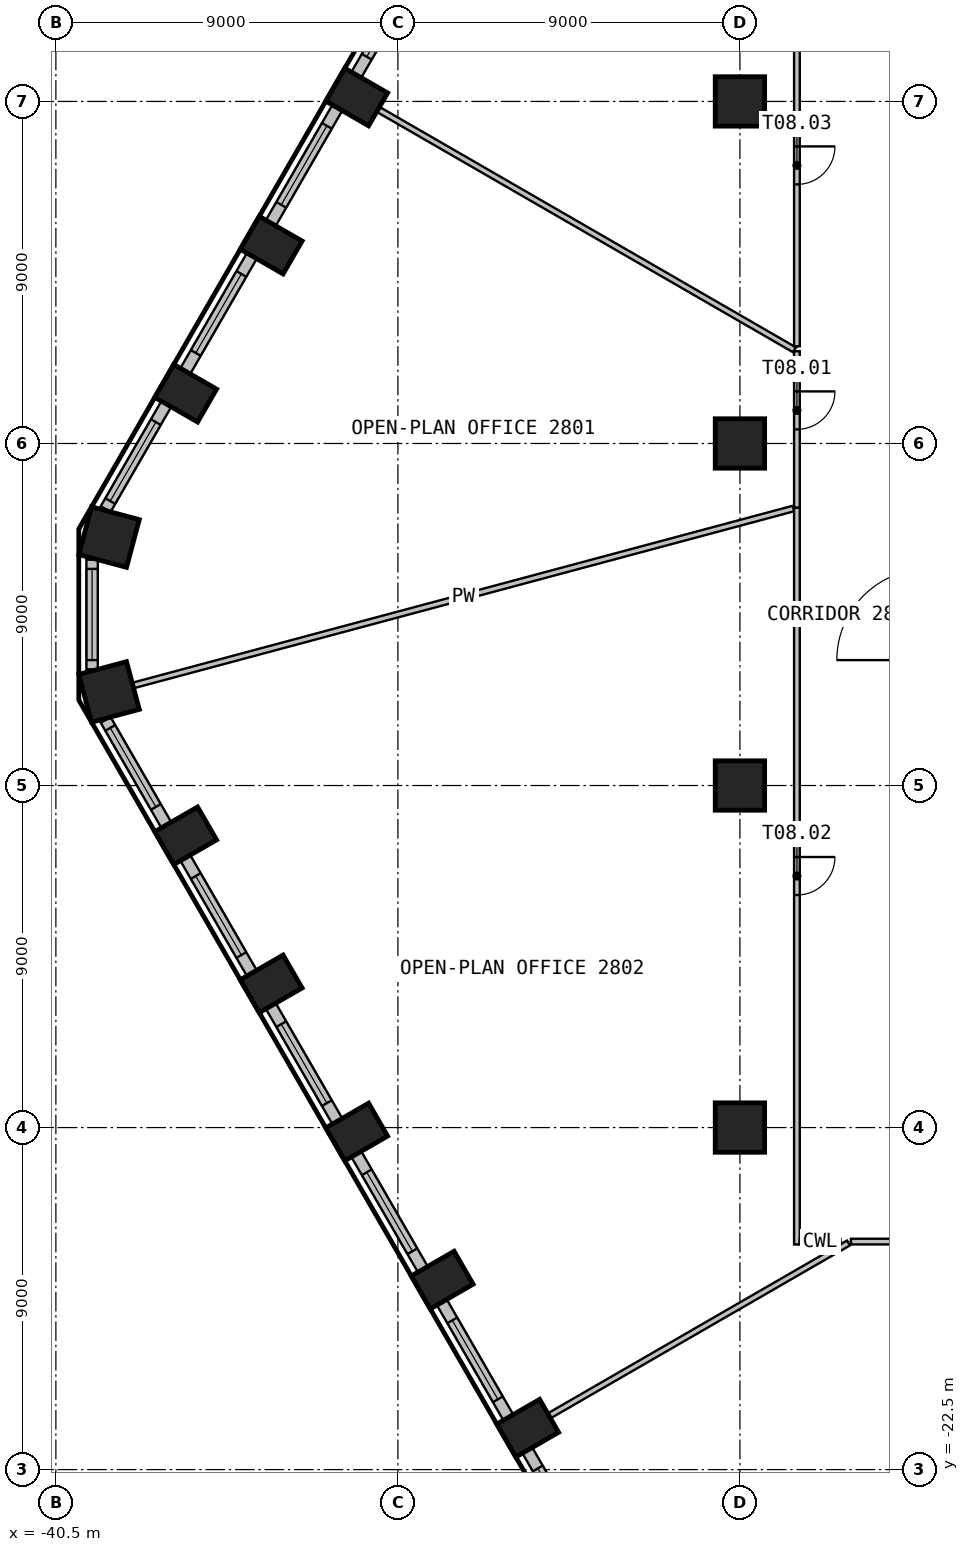
"""IFC4 building model, lengths in metres.
Left out: names, types, materials, properties, quantities, classifications, styles, units other than length and angle.
Written with IfcOpenShell. Run it as: python <this file> out.ifc"""

import sys

from ifc_helpers import new_model, si_unit, direction, frame, frame_2d, origin, origin_2d, place, context, subcontext, project, spatial, rectangle, circle, extrude, element, fill, save


model = new_model("IFC4")
c1 = context("Model", 3, precision=1e-05, world=origin(), true_north=direction((0.0, 1.0)))
c2 = subcontext(c1, "Body", "Model", "MODEL_VIEW")
j1 = project(units=[si_unit("LENGTHUNIT", "METRE"), si_unit("PLANEANGLEUNIT", "RADIAN")], contexts=[c1])
p1 = place(None, origin())
s1 = spatial("IfcSite", under=j1, at=p1, CompositionType="ELEMENT")
p2 = place(p1, origin())
s2 = spatial("IfcBuilding", under=s1, at=p2, CompositionType="ELEMENT")
p3 = place(p2, frame((0.0, 0.0, 116.4)))
s3 = spatial("IfcBuildingStorey", under=s2, at=p3, CompositionType="ELEMENT", Elevation=116.4)
for number, where, z_axis, x_axis in (
    (1, (-32.584, 13.616, 0.0), (0.0, 0.0, 1.0), (-0.5, -0.866, 0.0)),
    (2, (-34.834, 9.719, 0.0), (0.0, 0.0, 1.0), (-0.5, -0.866, 0.0)),
    (3, (-37.084, 5.822, 0.0), (0.0, 0.0, 1.0), (-0.5, -0.866, 0.0)),
):
    element("IfcColumn", number, at=place(p3, frame(where, z_axis=z_axis, x_axis=x_axis)), inside=s3, PredefinedType="COLUMN", context=c2, shape_type="SweptSolid", body=[
        extrude(rectangle(XDim=1.0, YDim=1.3, at=origin_2d()), origin(), (0.0, 0.0, 1.0), 3.525),
    ])
for number, where, z_axis, x_axis in (
    (4, (-39.101, 2.037, 0.0), (0.0, 0.0, 1.0), (-0.259, -0.966, 0.0)),
    (5, (-39.101, -2.037, 0.0), (0.0, 0.0, 1.0), (0.259, -0.966, 0.0)),
):
    element("IfcColumn", number, at=place(p3, frame(where, z_axis=z_axis, x_axis=x_axis)), inside=s3, PredefinedType="COLUMN", context=c2, shape_type="SweptSolid", body=[
        extrude(rectangle(XDim=1.3, YDim=1.3, at=origin_2d()), origin(), (0.0, 0.0, 1.0), 3.525),
    ])
for number, where, z_axis, x_axis in (
    (6, (-37.084, -5.822, 0.0), (0.0, 0.0, 1.0), (0.5, -0.866, 0.0)),
    (7, (-34.834, -9.719, 0.0), (0.0, 0.0, 1.0), (0.5, -0.866, 0.0)),
    (8, (-32.584, -13.616, 0.0), (0.0, 0.0, 1.0), (0.5, -0.866, 0.0)),
    (9, (-30.334, -17.513, 0.0), (0.0, 0.0, 1.0), (0.5, -0.866, 0.0)),
    (10, (-28.084, -21.411, 0.0), (0.0, 0.0, 1.0), (0.5, -0.866, 0.0)),
):
    element("IfcColumn", number, at=place(p3, frame(where, z_axis=z_axis, x_axis=x_axis)), inside=s3, PredefinedType="COLUMN", context=c2, shape_type="SweptSolid", body=[
        extrude(rectangle(XDim=1.0, YDim=1.3, at=origin_2d()), origin(), (0.0, 0.0, 1.0), 3.525),
    ])
for number, where, z_axis, x_axis in (
    (11, (-22.5, -13.5, 0.0), (0.0, 0.0, 1.0), (1.0, 0.0, 0.0)),
    (12, (-22.5, -4.5, 0.0), (0.0, 0.0, 1.0), (1.0, 0.0, 0.0)),
    (13, (-22.5, 4.5, 0.0), (0.0, 0.0, 1.0), (1.0, 0.0, 0.0)),
    (14, (-22.5, 13.5, 0.0), (0.0, 0.0, 1.0), (1.0, 0.0, 0.0)),
):
    element("IfcColumn", number, at=place(p3, frame(where, z_axis=z_axis, x_axis=x_axis)), inside=s3, PredefinedType="COLUMN", context=c2, shape_type="SweptSolid", body=[
        extrude(circle(Radius=0.65, at=origin_2d()), origin(), (0.0, 0.0, 1.0), 3.525),
    ])
p4 = place(p3, frame((-30.844, 17.23, 0.0), z_axis=(0.0, 0.0, 1.0), x_axis=(-0.499996256241, -0.866027565234, 0.0)))
e15 = element("IfcWall", 15, at=p4, inside=s3, PredefinedType="SOLIDWALL", context=c2, shape_type="SweptSolid", body=[
    extrude(rectangle(XDim=3.499, YDim=0.3, at=frame_2d((1.75, 0.0))), origin(), (0.0, 0.0, 1.0), 3.525),
])
p5 = place(p4, frame((0.55, 0.0, 0.9)))
e16 = element("IfcOpeningElement", 16, at=p5, cuts=e15, PredefinedType="OPENING", context=c2, shape_type="SweptSolid", body=[
    extrude(rectangle(XDim=2.4, YDim=2.1, at=frame_2d((1.2, 1.05))), frame((0.0, 0.16, 0.0), z_axis=(0.0, -1.0, 0.0), x_axis=(1.0, 0.0, 0.0)), (0.0, 0.0, 1.0), 0.32),
])
p6 = place(p3, frame((-33.094, 13.333, 0.0), z_axis=(0.0, 0.0, 1.0), x_axis=(-0.499996256241, -0.866027565234, 0.0)))
e17 = element("IfcWall", 17, at=p6, inside=s3, PredefinedType="SOLIDWALL", context=c2, shape_type="SweptSolid", body=[
    extrude(rectangle(XDim=3.499, YDim=0.3, at=frame_2d((1.75, 0.0))), origin(), (0.0, 0.0, 1.0), 3.525),
])
p7 = place(p6, frame((0.55, 0.0, 0.9)))
e18 = element("IfcOpeningElement", 18, at=p7, cuts=e17, PredefinedType="OPENING", context=c2, shape_type="SweptSolid", body=[
    extrude(rectangle(XDim=2.4, YDim=2.1, at=frame_2d((1.2, 1.05))), frame((0.0, 0.16, 0.0), z_axis=(0.0, -1.0, 0.0), x_axis=(1.0, 0.0, 0.0)), (0.0, 0.0, 1.0), 0.32),
])
p8 = place(p3, frame((-35.344, 9.436, 0.0), z_axis=(0.0, 0.0, 1.0), x_axis=(-0.499996256241, -0.866027565234, 0.0)))
e19 = element("IfcWall", 19, at=p8, inside=s3, PredefinedType="SOLIDWALL", context=c2, shape_type="SweptSolid", body=[
    extrude(rectangle(XDim=3.499, YDim=0.3, at=frame_2d((1.75, 0.0))), origin(), (0.0, 0.0, 1.0), 3.525),
])
p9 = place(p8, frame((0.55, 0.0, 0.9)))
e20 = element("IfcOpeningElement", 20, at=p9, cuts=e19, PredefinedType="OPENING", context=c2, shape_type="SweptSolid", body=[
    extrude(rectangle(XDim=2.4, YDim=2.1, at=frame_2d((1.2, 1.05))), frame((0.0, 0.16, 0.0), z_axis=(0.0, -1.0, 0.0), x_axis=(1.0, 0.0, 0.0)), (0.0, 0.0, 1.0), 0.32),
])
p10 = place(p3, frame((-37.594, 5.539, 0.0), z_axis=(0.0, 0.0, 1.0), x_axis=(-0.500004907028, -0.866022570692, 0.0)))
e21 = element("IfcWall", 21, at=p10, inside=s3, PredefinedType="SOLIDWALL", context=c2, shape_type="SweptSolid", body=[
    extrude(rectangle(XDim=3.192, YDim=0.3, at=frame_2d((1.596, 0.0))), origin(), (0.0, 0.0, 1.0), 3.525),
])
p11 = place(p10, frame((0.55, 0.0, 0.9)))
e22 = element("IfcOpeningElement", 22, at=p11, cuts=e21, PredefinedType="OPENING", context=c2, shape_type="SweptSolid", body=[
    extrude(rectangle(XDim=2.4, YDim=2.1, at=frame_2d((1.2, 1.05))), frame((0.0, 0.16, 0.0), z_axis=(0.0, -1.0, 0.0), x_axis=(1.0, 0.0, 0.0)), (0.0, 0.0, 1.0), 0.32),
])
p12 = place(p3, frame((-39.547, 1.443, 0.0), z_axis=(0.0, 0.0, 1.0), x_axis=(0.0, -1.0, 0.0)))
e23 = element("IfcWall", 23, at=p12, inside=s3, PredefinedType="SOLIDWALL", context=c2, shape_type="SweptSolid", body=[
    extrude(rectangle(XDim=2.886, YDim=0.3, at=frame_2d((1.443, 0.0))), origin(), (0.0, 0.0, 1.0), 3.525),
])
p13 = place(p12, frame((0.243, 0.0, 0.9)))
e24 = element("IfcOpeningElement", 24, at=p13, cuts=e23, PredefinedType="OPENING", context=c2, shape_type="SweptSolid", body=[
    extrude(rectangle(XDim=2.4, YDim=2.1, at=frame_2d((1.2, 1.05))), frame((0.0, 0.16, 0.0), z_axis=(0.0, -1.0, 0.0), x_axis=(1.0, 0.0, 0.0)), (0.0, 0.0, 1.0), 0.32),
])
p14 = place(p3, frame((-39.19, -2.774, 0.0), z_axis=(0.0, 0.0, 1.0), x_axis=(0.500004907028, -0.866022570692, 0.0)))
e25 = element("IfcWall", 25, at=p14, inside=s3, PredefinedType="SOLIDWALL", context=c2, shape_type="SweptSolid", body=[
    extrude(rectangle(XDim=3.192, YDim=0.3, at=frame_2d((1.596, 0.0))), origin(), (0.0, 0.0, 1.0), 3.525),
])
p15 = place(p14, frame((0.243, 0.0, 0.9)))
e26 = element("IfcOpeningElement", 26, at=p15, cuts=e25, PredefinedType="OPENING", context=c2, shape_type="SweptSolid", body=[
    extrude(rectangle(XDim=2.4, YDim=2.1, at=frame_2d((1.2, 1.05))), frame((0.0, 0.16, 0.0), z_axis=(0.0, -1.0, 0.0), x_axis=(1.0, 0.0, 0.0)), (0.0, 0.0, 1.0), 0.32),
])
p16 = place(p3, frame((-37.094, -6.406, 0.0), z_axis=(0.0, 0.0, 1.0), x_axis=(0.499996256241, -0.866027565234, 0.0)))
e27 = element("IfcWall", 27, at=p16, inside=s3, PredefinedType="SOLIDWALL", context=c2, shape_type="SweptSolid", body=[
    extrude(rectangle(XDim=3.499, YDim=0.3, at=frame_2d((1.75, 0.0))), origin(), (0.0, 0.0, 1.0), 3.525),
])
p17 = place(p16, frame((0.55, 0.0, 0.9)))
e28 = element("IfcOpeningElement", 28, at=p17, cuts=e27, PredefinedType="OPENING", context=c2, shape_type="SweptSolid", body=[
    extrude(rectangle(XDim=2.4, YDim=2.1, at=frame_2d((1.2, 1.05))), frame((0.0, 0.16, 0.0), z_axis=(0.0, -1.0, 0.0), x_axis=(1.0, 0.0, 0.0)), (0.0, 0.0, 1.0), 0.32),
])
p18 = place(p3, frame((-34.844, -10.303, 0.0), z_axis=(0.0, 0.0, 1.0), x_axis=(0.499996256241, -0.866027565234, 0.0)))
e29 = element("IfcWall", 29, at=p18, inside=s3, PredefinedType="SOLIDWALL", context=c2, shape_type="SweptSolid", body=[
    extrude(rectangle(XDim=3.499, YDim=0.3, at=frame_2d((1.75, 0.0))), origin(), (0.0, 0.0, 1.0), 3.525),
])
p19 = place(p18, frame((0.55, 0.0, 0.9)))
e30 = element("IfcOpeningElement", 30, at=p19, cuts=e29, PredefinedType="OPENING", context=c2, shape_type="SweptSolid", body=[
    extrude(rectangle(XDim=2.4, YDim=2.1, at=frame_2d((1.2, 1.05))), frame((0.0, 0.16, 0.0), z_axis=(0.0, -1.0, 0.0), x_axis=(1.0, 0.0, 0.0)), (0.0, 0.0, 1.0), 0.32),
])
p20 = place(p3, frame((-32.594, -14.2, 0.0), z_axis=(0.0, 0.0, 1.0), x_axis=(0.499996256241, -0.866027565234, 0.0)))
e31 = element("IfcWall", 31, at=p20, inside=s3, PredefinedType="SOLIDWALL", context=c2, shape_type="SweptSolid", body=[
    extrude(rectangle(XDim=3.499, YDim=0.3, at=frame_2d((1.75, 0.0))), origin(), (0.0, 0.0, 1.0), 3.525),
])
p21 = place(p20, frame((0.55, 0.0, 0.9)))
e32 = element("IfcOpeningElement", 32, at=p21, cuts=e31, PredefinedType="OPENING", context=c2, shape_type="SweptSolid", body=[
    extrude(rectangle(XDim=2.4, YDim=2.1, at=frame_2d((1.2, 1.05))), frame((0.0, 0.16, 0.0), z_axis=(0.0, -1.0, 0.0), x_axis=(1.0, 0.0, 0.0)), (0.0, 0.0, 1.0), 0.32),
])
p22 = place(p3, frame((-30.344, -18.097, 0.0), z_axis=(0.0, 0.0, 1.0), x_axis=(0.499996256241, -0.866027565234, 0.0)))
e33 = element("IfcWall", 33, at=p22, inside=s3, PredefinedType="SOLIDWALL", context=c2, shape_type="SweptSolid", body=[
    extrude(rectangle(XDim=3.499, YDim=0.3, at=frame_2d((1.75, 0.0))), origin(), (0.0, 0.0, 1.0), 3.525),
])
p23 = place(p22, frame((0.55, 0.0, 0.9)))
e34 = element("IfcOpeningElement", 34, at=p23, cuts=e33, PredefinedType="OPENING", context=c2, shape_type="SweptSolid", body=[
    extrude(rectangle(XDim=2.4, YDim=2.1, at=frame_2d((1.2, 1.05))), frame((0.0, 0.16, 0.0), z_axis=(0.0, -1.0, 0.0), x_axis=(1.0, 0.0, 0.0)), (0.0, 0.0, 1.0), 0.32),
])
p24 = place(p3, frame((-28.094, -21.994, 0.0), z_axis=(0.0, 0.0, 1.0), x_axis=(0.499996256241, -0.866027565234, 0.0)))
e35 = element("IfcWall", 35, at=p24, inside=s3, PredefinedType="SOLIDWALL", context=c2, shape_type="SweptSolid", body=[
    extrude(rectangle(XDim=3.499, YDim=0.3, at=frame_2d((1.75, 0.0))), origin(), (0.0, 0.0, 1.0), 3.525),
])
p25 = place(p24, frame((0.55, 0.0, 0.9)))
e36 = element("IfcOpeningElement", 36, at=p25, cuts=e35, PredefinedType="OPENING", context=c2, shape_type="SweptSolid", body=[
    extrude(rectangle(XDim=2.4, YDim=2.1, at=frame_2d((1.2, 1.05))), frame((0.0, 0.16, 0.0), z_axis=(0.0, -1.0, 0.0), x_axis=(1.0, 0.0, 0.0)), (0.0, 0.0, 1.0), 0.32),
])
p26 = place(p3, frame((-21.092, 2.788, 0.0), z_axis=(0.0, 0.0, 1.0), x_axis=(-0.965925618712, -0.25881981979, 0.0)))
e37 = element("IfcWall", 37, at=p26, inside=s3, PredefinedType="PARTITIONING", context=c2, shape_type="SweptSolid", body=[
    extrude(rectangle(XDim=17.974, YDim=0.15, at=frame_2d((8.987, 0.0))), origin(), (0.0, 0.0, 1.0), 3.525),
])
p27 = place(p3, frame((-32.004, 13.281, 0.0), z_axis=(0.0, 0.0, 1.0), x_axis=(0.866023362995, -0.500003534735, 0.0)))
e38 = element("IfcWall", 38, at=p27, inside=s3, PredefinedType="PARTITIONING", context=c2, shape_type="SweptSolid", body=[
    extrude(rectangle(XDim=12.631, YDim=0.15, at=frame_2d((6.316, 0.0))), origin(), (0.0, 0.0, 1.0), 3.525),
])
p28 = place(p3, frame((-19.644, -16.538, 0.0), z_axis=(0.0, 0.0, 1.0), x_axis=(-0.866004606565, -0.500036020111, 0.0)))
e39 = element("IfcWall", 39, at=p28, inside=s3, PredefinedType="PARTITIONING", context=c2, shape_type="SweptSolid", body=[
    extrude(rectangle(XDim=9.076, YDim=0.15, at=frame_2d((4.538, 0.0))), origin(), (0.0, 0.0, 1.0), 3.525),
])
p29 = place(p3, frame((-21.0, 2.813, 0.0), z_axis=(0.0, 0.0, 1.0), x_axis=(0.0, -1.0, 0.0)))
e40 = element("IfcWall", 40, at=p29, inside=s3, PredefinedType="PARTITIONING", context=c2, shape_type="SweptSolid", body=[
    extrude(rectangle(XDim=19.388, YDim=0.15, at=frame_2d((9.694, 0.0))), origin(), (0.0, 0.0, 1.0), 3.525),
])
p30 = place(p29, frame((9.194, 0.0, 0.0)))
e41 = element("IfcOpeningElement", 41, at=p30, cuts=e40, PredefinedType="OPENING", context=c2, shape_type="SweptSolid", body=[
    extrude(rectangle(XDim=1.0, YDim=2.1, at=frame_2d((0.5, 1.05))), frame((0.0, 0.085, 0.0), z_axis=(0.0, -1.0, 0.0), x_axis=(1.0, 0.0, 0.0)), (0.0, 0.0, 1.0), 0.17),
])
p31 = place(p3, frame((-20.925, -16.5, 0.0), z_axis=(0.0, 0.0, 1.0), x_axis=(1.0, 0.0, 0.0)))
e42 = element("IfcWall", 42, at=p31, inside=s3, PredefinedType="PARTITIONING", context=c2, shape_type="SweptSolid", body=[
    extrude(rectangle(XDim=1.071, YDim=0.15, at=frame_2d((0.536, 0.0))), origin(), (0.0, 0.0, 1.0), 3.525),
])
p32 = place(p3, frame((-21.0, 6.928, 0.0), z_axis=(0.0, 0.0, 1.0), x_axis=(0.0, -1.0, 0.0)))
e43 = element("IfcWall", 43, at=p32, inside=s3, PredefinedType="PARTITIONING", context=c2, shape_type="SweptSolid", body=[
    extrude(rectangle(XDim=4.115, YDim=0.15, at=frame_2d((2.058, 0.0))), origin(), (0.0, 0.0, 1.0), 3.525),
])
p33 = place(p32, frame((1.058, 0.0, 0.0)))
e44 = element("IfcOpeningElement", 44, at=p33, cuts=e43, PredefinedType="OPENING", context=c2, shape_type="SweptSolid", body=[
    extrude(rectangle(XDim=1.0, YDim=2.1, at=frame_2d((0.5, 1.05))), frame((0.0, 0.085, 0.0), z_axis=(0.0, -1.0, 0.0), x_axis=(1.0, 0.0, 0.0)), (0.0, 0.0, 1.0), 0.17),
])
p34 = place(p3, frame((-21.0, 16.575, 0.0), z_axis=(0.0, 0.0, 1.0), x_axis=(0.0, -1.0, 0.0)))
e45 = element("IfcWall", 45, at=p34, inside=s3, PredefinedType="PARTITIONING", context=c2, shape_type="SweptSolid", body=[
    extrude(rectangle(XDim=9.517, YDim=0.15, at=frame_2d((4.758, 0.0))), origin(), (0.0, 0.0, 1.0), 3.525),
])
p35 = place(p34, frame((4.259, 0.0, 0.0)))
e46 = element("IfcOpeningElement", 46, at=p35, cuts=e45, PredefinedType="OPENING", context=c2, shape_type="SweptSolid", body=[
    extrude(rectangle(XDim=1.0, YDim=2.1, at=frame_2d((0.5, 1.05))), frame((0.0, 0.085, 0.0), z_axis=(0.0, -1.0, 0.0), x_axis=(1.0, 0.0, 0.0)), (0.0, 0.0, 1.0), 0.17),
])
p36 = place(p3, frame((-19.579, -16.5, 0.0), z_axis=(0.0, 0.0, 1.0), x_axis=(1.0, 0.0, 0.0)))
e47 = element("IfcWall", 47, at=p36, inside=s3, PredefinedType="PARTITIONING", context=c2, shape_type="SweptSolid", body=[
    extrude(rectangle(XDim=8.329, YDim=0.15, at=frame_2d((4.165, 0.0))), origin(), (0.0, 0.0, 1.0), 3.525),
])
p37 = place(p5, origin())
e48 = element("IfcWindow", 48, at=p37, inside=s3, PartitioningType="SINGLE_PANEL", PredefinedType="WINDOW", context=c2, shape_type="SweptSolid", body=[
    extrude(rectangle(XDim=2.4, YDim=2.1, at=frame_2d((1.2, 1.05))), frame((0.0, 0.03, 0.0), z_axis=(0.0, -1.0, 0.0), x_axis=(1.0, 0.0, 0.0)), (0.0, 0.0, 1.0), 0.06),
])
fill(e16, e48)
p38 = place(p7, origin())
e49 = element("IfcWindow", 49, at=p38, inside=s3, PartitioningType="SINGLE_PANEL", PredefinedType="WINDOW", context=c2, shape_type="SweptSolid", body=[
    extrude(rectangle(XDim=2.4, YDim=2.1, at=frame_2d((1.2, 1.05))), frame((0.0, 0.03, 0.0), z_axis=(0.0, -1.0, 0.0), x_axis=(1.0, 0.0, 0.0)), (0.0, 0.0, 1.0), 0.06),
])
fill(e18, e49)
p39 = place(p9, origin())
e50 = element("IfcWindow", 50, at=p39, inside=s3, PartitioningType="SINGLE_PANEL", PredefinedType="WINDOW", context=c2, shape_type="SweptSolid", body=[
    extrude(rectangle(XDim=2.4, YDim=2.1, at=frame_2d((1.2, 1.05))), frame((0.0, 0.03, 0.0), z_axis=(0.0, -1.0, 0.0), x_axis=(1.0, 0.0, 0.0)), (0.0, 0.0, 1.0), 0.06),
])
fill(e20, e50)
p40 = place(p11, origin())
e51 = element("IfcWindow", 51, at=p40, inside=s3, PartitioningType="SINGLE_PANEL", PredefinedType="WINDOW", context=c2, shape_type="SweptSolid", body=[
    extrude(rectangle(XDim=2.4, YDim=2.1, at=frame_2d((1.2, 1.05))), frame((0.0, 0.03, 0.0), z_axis=(0.0, -1.0, 0.0), x_axis=(1.0, 0.0, 0.0)), (0.0, 0.0, 1.0), 0.06),
])
fill(e22, e51)
p41 = place(p13, origin())
e52 = element("IfcWindow", 52, at=p41, inside=s3, PartitioningType="SINGLE_PANEL", PredefinedType="WINDOW", context=c2, shape_type="SweptSolid", body=[
    extrude(rectangle(XDim=2.4, YDim=2.1, at=frame_2d((1.2, 1.05))), frame((0.0, 0.03, 0.0), z_axis=(0.0, -1.0, 0.0), x_axis=(1.0, 0.0, 0.0)), (0.0, 0.0, 1.0), 0.06),
])
fill(e24, e52)
p42 = place(p15, origin())
e53 = element("IfcWindow", 53, at=p42, inside=s3, PartitioningType="SINGLE_PANEL", PredefinedType="WINDOW", context=c2, shape_type="SweptSolid", body=[
    extrude(rectangle(XDim=2.4, YDim=2.1, at=frame_2d((1.2, 1.05))), frame((0.0, 0.03, 0.0), z_axis=(0.0, -1.0, 0.0), x_axis=(1.0, 0.0, 0.0)), (0.0, 0.0, 1.0), 0.06),
])
fill(e26, e53)
p43 = place(p17, origin())
e54 = element("IfcWindow", 54, at=p43, inside=s3, PartitioningType="SINGLE_PANEL", PredefinedType="WINDOW", context=c2, shape_type="SweptSolid", body=[
    extrude(rectangle(XDim=2.4, YDim=2.1, at=frame_2d((1.2, 1.05))), frame((0.0, 0.03, 0.0), z_axis=(0.0, -1.0, 0.0), x_axis=(1.0, 0.0, 0.0)), (0.0, 0.0, 1.0), 0.06),
])
fill(e28, e54)
p44 = place(p19, origin())
e55 = element("IfcWindow", 55, at=p44, inside=s3, PartitioningType="SINGLE_PANEL", PredefinedType="WINDOW", context=c2, shape_type="SweptSolid", body=[
    extrude(rectangle(XDim=2.4, YDim=2.1, at=frame_2d((1.2, 1.05))), frame((0.0, 0.03, 0.0), z_axis=(0.0, -1.0, 0.0), x_axis=(1.0, 0.0, 0.0)), (0.0, 0.0, 1.0), 0.06),
])
fill(e30, e55)
p45 = place(p21, origin())
e56 = element("IfcWindow", 56, at=p45, inside=s3, PartitioningType="SINGLE_PANEL", PredefinedType="WINDOW", context=c2, shape_type="SweptSolid", body=[
    extrude(rectangle(XDim=2.4, YDim=2.1, at=frame_2d((1.2, 1.05))), frame((0.0, 0.03, 0.0), z_axis=(0.0, -1.0, 0.0), x_axis=(1.0, 0.0, 0.0)), (0.0, 0.0, 1.0), 0.06),
])
fill(e32, e56)
p46 = place(p23, origin())
e57 = element("IfcWindow", 57, at=p46, inside=s3, PartitioningType="SINGLE_PANEL", PredefinedType="WINDOW", context=c2, shape_type="SweptSolid", body=[
    extrude(rectangle(XDim=2.4, YDim=2.1, at=frame_2d((1.2, 1.05))), frame((0.0, 0.03, 0.0), z_axis=(0.0, -1.0, 0.0), x_axis=(1.0, 0.0, 0.0)), (0.0, 0.0, 1.0), 0.06),
])
fill(e34, e57)
p47 = place(p25, origin())
e58 = element("IfcWindow", 58, at=p47, inside=s3, PartitioningType="SINGLE_PANEL", PredefinedType="WINDOW", context=c2, shape_type="SweptSolid", body=[
    extrude(rectangle(XDim=2.4, YDim=2.1, at=frame_2d((1.2, 1.05))), frame((0.0, 0.03, 0.0), z_axis=(0.0, -1.0, 0.0), x_axis=(1.0, 0.0, 0.0)), (0.0, 0.0, 1.0), 0.06),
])
fill(e36, e58)
p48 = place(p33, origin())
e59 = element("IfcDoor", 59, at=p48, inside=s3, OperationType="SINGLE_SWING_LEFT", PredefinedType="DOOR", context=c2, shape_type="SweptSolid", body=[
    extrude(rectangle(XDim=1.0, YDim=2.1, at=frame_2d((0.5, 1.05))), frame((0.0, 0.025, 0.0), z_axis=(0.0, -1.0, 0.0), x_axis=(1.0, 0.0, 0.0)), (0.0, 0.0, 1.0), 0.05),
])
fill(e44, e59)
p49 = place(p30, origin())
e60 = element("IfcDoor", 60, at=p49, inside=s3, OperationType="SINGLE_SWING_RIGHT", PredefinedType="DOOR", context=c2, shape_type="SweptSolid", body=[
    extrude(rectangle(XDim=1.0, YDim=2.1, at=frame_2d((0.5, 1.05))), frame((0.0, 0.025, 0.0), z_axis=(0.0, -1.0, 0.0), x_axis=(1.0, 0.0, 0.0)), (0.0, 0.0, 1.0), 0.05),
])
fill(e41, e60)
p50 = place(p35, origin())
e61 = element("IfcDoor", 61, at=p50, inside=s3, OperationType="SINGLE_SWING_RIGHT", PredefinedType="DOOR", context=c2, shape_type="SweptSolid", body=[
    extrude(rectangle(XDim=1.0, YDim=2.1, at=frame_2d((0.5, 1.05))), frame((0.0, 0.025, 0.0), z_axis=(0.0, -1.0, 0.0), x_axis=(1.0, 0.0, 0.0)), (0.0, 0.0, 1.0), 0.05),
])
fill(e46, e61)
save(model, sys.argv[1])
